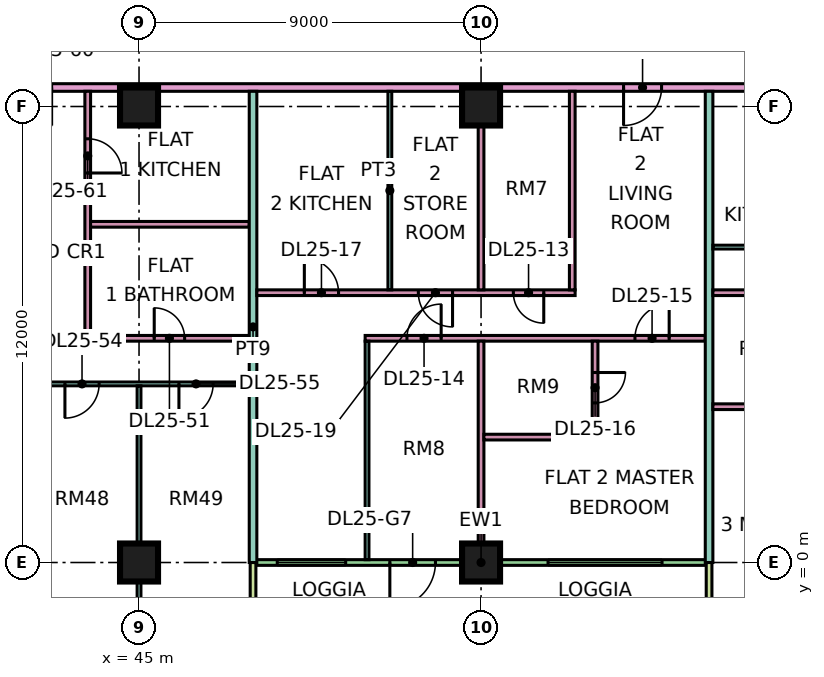
"""IFC4 building model, lengths in metres.
Left out: names, types, materials, properties, quantities, classifications, styles, units other than length and angle.
Written with IfcOpenShell. Run it as: python <this file> out.ifc"""

import sys

from ifc_helpers import new_model, si_unit, direction, frame, frame_2d, origin, origin_2d, place, context, subcontext, project, spatial, rectangle, extrude, element, fill, save


model = new_model("IFC4")
c1 = context("Model", 3, precision=1e-05, world=origin(), true_north=direction((0.0, 1.0)))
c2 = subcontext(c1, "Body", "Model", "MODEL_VIEW")
j1 = project(units=[si_unit("LENGTHUNIT", "METRE"), si_unit("PLANEANGLEUNIT", "RADIAN")], contexts=[c1])
p1 = place(None, origin())
s1 = spatial("IfcSite", under=j1, at=p1, CompositionType="ELEMENT")
p2 = place(p1, origin())
s2 = spatial("IfcBuilding", under=s1, at=p2, CompositionType="ELEMENT")
p3 = place(p2, frame((0.0, 0.0, 110.65)))
s3 = spatial("IfcBuildingStorey", under=s2, at=p3, CompositionType="ELEMENT", Elevation=110.65)
for number, where, z_axis, x_axis in (
    (1, (45.0, 0.0, 0.0), (0.0, 0.0, 1.0), (1.0, 0.0, 0.0)),
    (2, (45.0, 12.0, 0.0), (0.0, 0.0, 1.0), (1.0, 0.0, 0.0)),
    (3, (54.0, 0.0, 0.0), (0.0, 0.0, 1.0), (1.0, 0.0, 0.0)),
    (4, (54.0, 12.0, 0.0), (0.0, 0.0, 1.0), (1.0, 0.0, 0.0)),
):
    element("IfcColumn", number, at=place(p3, frame(where, z_axis=z_axis, x_axis=x_axis)), inside=s3, PredefinedType="COLUMN", context=c2, shape_type="SweptSolid", body=[
        extrude(rectangle(XDim=1.0, YDim=1.0, at=origin_2d()), origin(), (0.0, 0.0, 1.0), 3.75),
    ])
p4 = place(p3, frame((48.075, 0.0, 0.0), z_axis=(0.0, 0.0, 1.0), x_axis=(1.0, 0.0, 0.0)))
e5 = element("IfcWall", 5, at=p4, inside=s3, PredefinedType="SOLIDWALL", context=c2, shape_type="SweptSolid", body=[
    extrude(rectangle(XDim=11.85, YDim=0.15, at=frame_2d((5.925, 0.0))), origin(), (0.0, 0.0, 1.0), 3.35),
])
p5 = place(p4, frame((0.562, 0.0, 0.45)))
e6 = element("IfcOpeningElement", 6, at=p5, cuts=e5, PredefinedType="OPENING", context=c2, shape_type="SweptSolid", body=[
    extrude(rectangle(XDim=1.8, YDim=2.4, at=frame_2d((0.9, 1.2))), frame((0.0, 0.085, 0.0), z_axis=(0.0, -1.0, 0.0), x_axis=(1.0, 0.0, 0.0)), (0.0, 0.0, 1.0), 0.17),
])
p6 = place(p4, frame((3.525, 0.0, 0.0)))
e7 = element("IfcOpeningElement", 7, at=p6, cuts=e5, PredefinedType="OPENING", context=c2, shape_type="SweptSolid", body=[
    extrude(rectangle(XDim=1.2, YDim=2.4, at=frame_2d((0.6, 1.2))), frame((0.0, 0.085, 0.0), z_axis=(0.0, -1.0, 0.0), x_axis=(1.0, 0.0, 0.0)), (0.0, 0.0, 1.0), 0.17),
])
p7 = place(p4, frame((7.688, 0.0, 0.45)))
e8 = element("IfcOpeningElement", 8, at=p7, cuts=e5, PredefinedType="OPENING", context=c2, shape_type="SweptSolid", body=[
    extrude(rectangle(XDim=3.0, YDim=2.4, at=frame_2d((1.5, 1.2))), frame((0.0, 0.085, 0.0), z_axis=(0.0, -1.0, 0.0), x_axis=(1.0, 0.0, 0.0)), (0.0, 0.0, 1.0), 0.17),
])
for number, where, z_axis, x_axis in (
    (9, (48.0, -1.5, 0.0), (0.0, 0.0, 1.0), (0.0, 1.0, 0.0)),
    (10, (60.0, -1.5, 0.0), (0.0, 0.0, 1.0), (0.0, 1.0, 0.0)),
):
    element("IfcWall", number, at=place(p3, frame(where, z_axis=z_axis, x_axis=x_axis)), inside=s3, PredefinedType="SOLIDWALL", context=c2, shape_type="SweptSolid", body=[
        extrude(rectangle(XDim=1.5, YDim=0.15, at=frame_2d((0.75, 0.0))), origin(), (0.0, 0.0, 1.0), 3.35),
    ])
p8 = place(p3, frame((33.05, 4.7, 0.0), z_axis=(0.0, 0.0, 1.0), x_axis=(1.0, 0.0, 0.0)))
e11 = element("IfcWall", 11, at=p8, inside=s3, PredefinedType="PARTITIONING", context=c2, shape_type="SweptSolid", body=[
    extrude(rectangle(XDim=14.85, YDim=0.1, at=frame_2d((7.425, 0.0))), origin(), (0.0, 0.0, 1.0), 3.35),
])
p9 = place(p8, frame((10.0, 0.0, 0.0)))
e12 = element("IfcOpeningElement", 12, at=p9, cuts=e11, PredefinedType="OPENING", context=c2, shape_type="SweptSolid", body=[
    extrude(rectangle(XDim=0.9, YDim=2.1, at=frame_2d((0.45, 1.05))), frame((0.0, 0.06, 0.0), z_axis=(0.0, -1.0, 0.0), x_axis=(1.0, 0.0, 0.0)), (0.0, 0.0, 1.0), 0.12),
])
p10 = place(p8, frame((13.0, 0.0, 0.0)))
e13 = element("IfcOpeningElement", 13, at=p10, cuts=e11, PredefinedType="OPENING", context=c2, shape_type="SweptSolid", body=[
    extrude(rectangle(XDim=0.9, YDim=2.1, at=frame_2d((0.45, 1.05))), frame((0.0, 0.06, 0.0), z_axis=(0.0, -1.0, 0.0), x_axis=(1.0, 0.0, 0.0)), (0.0, 0.0, 1.0), 0.12),
])
p11 = place(p8, frame((4.0, 0.0, 0.0)))
e14 = element("IfcOpeningElement", 14, at=p11, cuts=e11, PredefinedType="OPENING", context=c2, shape_type="SweptSolid", body=[
    extrude(rectangle(XDim=0.9, YDim=2.1, at=frame_2d((0.45, 1.05))), frame((0.0, 0.06, 0.0), z_axis=(0.0, -1.0, 0.0), x_axis=(1.0, 0.0, 0.0)), (0.0, 0.0, 1.0), 0.12),
])
p12 = place(p3, frame((40.65, 12.5, 0.0), z_axis=(0.0, 0.0, 1.0), x_axis=(1.0, 0.0, 0.0)))
e15 = element("IfcWall", 15, at=p12, inside=s3, PredefinedType="PARTITIONING", context=c2, shape_type="SweptSolid", body=[
    extrude(rectangle(XDim=31.35, YDim=0.2, at=frame_2d((15.675, 0.0))), origin(), (0.0, 0.0, 1.0), 3.35),
])
p13 = place(p12, frame((17.1, 0.0, 0.0)))
e16 = element("IfcOpeningElement", 16, at=p13, cuts=e15, PredefinedType="OPENING", context=c2, shape_type="SweptSolid", body=[
    extrude(rectangle(XDim=1.0, YDim=2.1, at=frame_2d((0.5, 1.05))), frame((0.0, 0.11, 0.0), z_axis=(0.0, -1.0, 0.0), x_axis=(1.0, 0.0, 0.0)), (0.0, 0.0, 1.0), 0.22),
])
p14 = place(p12, frame((23.7, 0.0, 0.0)))
e17 = element("IfcOpeningElement", 17, at=p14, cuts=e15, PredefinedType="OPENING", context=c2, shape_type="SweptSolid", body=[
    extrude(rectangle(XDim=1.0, YDim=2.1, at=frame_2d((0.5, 1.05))), frame((0.0, 0.11, 0.0), z_axis=(0.0, -1.0, 0.0), x_axis=(1.0, 0.0, 0.0)), (0.0, 0.0, 1.0), 0.22),
])
p15 = place(p12, frame((1.05, 0.0, 0.0)))
e18 = element("IfcOpeningElement", 18, at=p15, cuts=e15, PredefinedType="OPENING", context=c2, shape_type="SweptSolid", body=[
    extrude(rectangle(XDim=1.0, YDim=2.1, at=frame_2d((0.5, 1.05))), frame((0.0, 0.11, 0.0), z_axis=(0.0, -1.0, 0.0), x_axis=(1.0, 0.0, 0.0)), (0.0, 0.0, 1.0), 0.22),
])
p16 = place(p3, frame((43.65, 5.825, 0.0), z_axis=(0.0, 0.0, 1.0), x_axis=(0.0, 1.0, 0.0)))
e19 = element("IfcWall", 19, at=p16, inside=s3, PredefinedType="PARTITIONING", context=c2, shape_type="SweptSolid", body=[
    extrude(rectangle(XDim=6.575, YDim=0.15, at=frame_2d((3.288, 0.0))), origin(), (0.0, 0.0, 1.0), 3.35),
])
p17 = place(p16, frame((4.425, 0.0, 0.0)))
e20 = element("IfcOpeningElement", 20, at=p17, cuts=e19, PredefinedType="OPENING", context=c2, shape_type="SweptSolid", body=[
    extrude(rectangle(XDim=0.9, YDim=2.1, at=frame_2d((0.45, 1.05))), frame((0.0, 0.085, 0.0), z_axis=(0.0, -1.0, 0.0), x_axis=(1.0, 0.0, 0.0)), (0.0, 0.0, 1.0), 0.17),
])
p18 = place(p3, frame((43.725, 5.9, 0.0), z_axis=(0.0, 0.0, 1.0), x_axis=(1.0, 0.0, 0.0)))
e21 = element("IfcWall", 21, at=p18, inside=s3, PredefinedType="PARTITIONING", context=c2, shape_type="SweptSolid", body=[
    extrude(rectangle(XDim=4.175, YDim=0.15, at=frame_2d((2.087, 0.0))), origin(), (0.0, 0.0, 1.0), 3.35),
])
p19 = place(p18, frame((1.675, 0.0, 0.0)))
e22 = element("IfcOpeningElement", 22, at=p19, cuts=e21, PredefinedType="OPENING", context=c2, shape_type="SweptSolid", body=[
    extrude(rectangle(XDim=0.8, YDim=2.1, at=frame_2d((0.4, 1.05))), frame((0.0, 0.085, 0.0), z_axis=(0.0, -1.0, 0.0), x_axis=(1.0, 0.0, 0.0)), (0.0, 0.0, 1.0), 0.17),
])
p20 = place(p3, frame((43.725, 8.9, 0.0), z_axis=(0.0, 0.0, 1.0), x_axis=(1.0, 0.0, 0.0)))
e23 = element("IfcWall", 23, at=p20, inside=s3, PredefinedType="PARTITIONING", context=c2, shape_type="SweptSolid", body=[
    extrude(rectangle(XDim=4.175, YDim=0.15, at=frame_2d((2.087, 0.0))), origin(), (0.0, 0.0, 1.0), 3.35),
])
p21 = place(p3, frame((45.0, -1.351, 0.0), z_axis=(0.0, 0.0, 1.0), x_axis=(0.0, 1.0, 0.0)))
e24 = element("IfcWall", 24, at=p21, inside=s3, PredefinedType="PARTITIONING", context=c2, shape_type="SweptSolid", body=[
    extrude(rectangle(XDim=6.001, YDim=0.1, at=frame_2d((3.0, 0.0))), origin(), (0.0, 0.0, 1.0), 3.35),
])
p22 = place(p3, frame((48.0, 0.0, 0.0), z_axis=(0.0, 0.0, 1.0), x_axis=(0.0, 1.0, 0.0)))
e25 = element("IfcWall", 25, at=p22, inside=s3, PredefinedType="PARTITIONING", context=c2, shape_type="SweptSolid", body=[
    extrude(rectangle(XDim=12.4, YDim=0.2, at=frame_2d((6.2, 0.0))), origin(), (0.0, 0.0, 1.0), 3.35),
])
p23 = place(p3, frame((48.1, 7.1, 0.0), z_axis=(0.0, 0.0, 1.0), x_axis=(1.0, 0.0, 0.0)))
e26 = element("IfcWall", 26, at=p23, inside=s3, PredefinedType="PARTITIONING", context=c2, shape_type="SweptSolid", body=[
    extrude(rectangle(XDim=8.375, YDim=0.15, at=frame_2d((4.188, 0.0))), origin(), (0.0, 0.0, 1.0), 3.35),
])
p24 = place(p23, frame((6.75, 0.0, 0.0)))
e27 = element("IfcOpeningElement", 27, at=p24, cuts=e26, PredefinedType="OPENING", context=c2, shape_type="SweptSolid", body=[
    extrude(rectangle(XDim=0.8, YDim=2.1, at=frame_2d((0.4, 1.05))), frame((0.0, 0.085, 0.0), z_axis=(0.0, -1.0, 0.0), x_axis=(1.0, 0.0, 0.0)), (0.0, 0.0, 1.0), 0.17),
])
p25 = place(p23, frame((1.25, 0.0, 0.0)))
e28 = element("IfcOpeningElement", 28, at=p25, cuts=e26, PredefinedType="OPENING", context=c2, shape_type="SweptSolid", body=[
    extrude(rectangle(XDim=0.9, YDim=2.1, at=frame_2d((0.45, 1.05))), frame((0.0, 0.085, 0.0), z_axis=(0.0, -1.0, 0.0), x_axis=(1.0, 0.0, 0.0)), (0.0, 0.0, 1.0), 0.17),
])
p26 = place(p23, frame((4.25, 0.0, 0.0)))
e29 = element("IfcOpeningElement", 29, at=p26, cuts=e26, PredefinedType="OPENING", context=c2, shape_type="SweptSolid", body=[
    extrude(rectangle(XDim=0.9, YDim=2.1, at=frame_2d((0.45, 1.05))), frame((0.0, 0.085, 0.0), z_axis=(0.0, -1.0, 0.0), x_axis=(1.0, 0.0, 0.0)), (0.0, 0.0, 1.0), 0.17),
])
p27 = place(p3, frame((50.95, 5.9, 0.0), z_axis=(0.0, 0.0, 1.0), x_axis=(1.0, 0.0, 0.0)))
e30 = element("IfcWall", 30, at=p27, inside=s3, PredefinedType="PARTITIONING", context=c2, shape_type="SweptSolid", body=[
    extrude(rectangle(XDim=8.95, YDim=0.15, at=frame_2d((4.475, 0.0))), origin(), (0.0, 0.0, 1.0), 3.35),
])
p28 = place(p27, frame((1.1, 0.0, 0.0)))
e31 = element("IfcOpeningElement", 31, at=p28, cuts=e30, PredefinedType="OPENING", context=c2, shape_type="SweptSolid", body=[
    extrude(rectangle(XDim=0.9, YDim=2.1, at=frame_2d((0.45, 1.05))), frame((0.0, 0.085, 0.0), z_axis=(0.0, -1.0, 0.0), x_axis=(1.0, 0.0, 0.0)), (0.0, 0.0, 1.0), 0.17),
])
p29 = place(p27, frame((7.1, 0.0, 0.0)))
e32 = element("IfcOpeningElement", 32, at=p29, cuts=e30, PredefinedType="OPENING", context=c2, shape_type="SweptSolid", body=[
    extrude(rectangle(XDim=0.9, YDim=2.1, at=frame_2d((0.45, 1.05))), frame((0.0, 0.085, 0.0), z_axis=(0.0, -1.0, 0.0), x_axis=(1.0, 0.0, 0.0)), (0.0, 0.0, 1.0), 0.17),
])
p30 = place(p3, frame((51.0, 0.074, 0.0), z_axis=(0.0, 0.0, 1.0), x_axis=(0.0, 1.0, 0.0)))
e33 = element("IfcWall", 33, at=p30, inside=s3, PredefinedType="PARTITIONING", context=c2, shape_type="SweptSolid", body=[
    extrude(rectangle(XDim=5.751, YDim=0.1, at=frame_2d((2.875, 0.0))), origin(), (0.0, 0.0, 1.0), 3.35),
])
p31 = place(p3, frame((51.6, 7.175, 0.0), z_axis=(0.0, 0.0, 1.0), x_axis=(0.0, 1.0, 0.0)))
e34 = element("IfcWall", 34, at=p31, inside=s3, PredefinedType="PARTITIONING", context=c2, shape_type="SweptSolid", body=[
    extrude(rectangle(XDim=5.225, YDim=0.1, at=frame_2d((2.612, 0.0))), origin(), (0.0, 0.0, 1.0), 3.35),
])
p32 = place(p3, frame((54.0, 0.074, 0.0), z_axis=(0.0, 0.0, 1.0), x_axis=(0.0, 1.0, 0.0)))
e35 = element("IfcWall", 35, at=p32, inside=s3, PredefinedType="PARTITIONING", context=c2, shape_type="SweptSolid", body=[
    extrude(rectangle(XDim=5.751, YDim=0.15, at=frame_2d((2.875, 0.0))), origin(), (0.0, 0.0, 1.0), 3.35),
])
p33 = place(p3, frame((54.0, 7.175, 0.0), z_axis=(0.0, 0.0, 1.0), x_axis=(0.0, 1.0, 0.0)))
e36 = element("IfcWall", 36, at=p33, inside=s3, PredefinedType="PARTITIONING", context=c2, shape_type="SweptSolid", body=[
    extrude(rectangle(XDim=5.225, YDim=0.15, at=frame_2d((2.612, 0.0))), origin(), (0.0, 0.0, 1.0), 3.35),
])
p34 = place(p3, frame((54.075, 3.3, 0.0), z_axis=(0.0, 0.0, 1.0), x_axis=(1.0, 0.0, 0.0)))
e37 = element("IfcWall", 37, at=p34, inside=s3, PredefinedType="PARTITIONING", context=c2, shape_type="SweptSolid", body=[
    extrude(rectangle(XDim=3.0, YDim=0.15, at=frame_2d((1.5, 0.0))), origin(), (0.0, 0.0, 1.0), 3.35),
])
p35 = place(p3, frame((56.4, 7.175, 0.0), z_axis=(0.0, 0.0, 1.0), x_axis=(0.0, 1.0, 0.0)))
e38 = element("IfcWall", 38, at=p35, inside=s3, PredefinedType="PARTITIONING", context=c2, shape_type="SweptSolid", body=[
    extrude(rectangle(XDim=5.225, YDim=0.15, at=frame_2d((2.612, 0.0))), origin(), (0.0, 0.0, 1.0), 3.35),
])
p36 = place(p3, frame((57.0, 3.375, 0.0), z_axis=(0.0, 0.0, 1.0), x_axis=(0.0, 1.0, 0.0)))
e39 = element("IfcWall", 39, at=p36, inside=s3, PredefinedType="PARTITIONING", context=c2, shape_type="SweptSolid", body=[
    extrude(rectangle(XDim=2.45, YDim=0.15, at=frame_2d((1.225, 0.0))), origin(), (0.0, 0.0, 1.0), 3.35),
])
p37 = place(p36, frame((0.825, 0.0, 0.0)))
e40 = element("IfcOpeningElement", 40, at=p37, cuts=e39, PredefinedType="OPENING", context=c2, shape_type="SweptSolid", body=[
    extrude(rectangle(XDim=0.8, YDim=2.1, at=frame_2d((0.4, 1.05))), frame((0.0, 0.085, 0.0), z_axis=(0.0, -1.0, 0.0), x_axis=(1.0, 0.0, 0.0)), (0.0, 0.0, 1.0), 0.17),
])
p38 = place(p3, frame((60.0, 0.0, 0.0), z_axis=(0.0, 0.0, 1.0), x_axis=(0.0, 1.0, 0.0)))
e41 = element("IfcWall", 41, at=p38, inside=s3, PredefinedType="PARTITIONING", context=c2, shape_type="SweptSolid", body=[
    extrude(rectangle(XDim=12.4, YDim=0.2, at=frame_2d((6.2, 0.0))), origin(), (0.0, 0.0, 1.0), 3.35),
])
p39 = place(p3, frame((60.1, 4.1, 0.0), z_axis=(0.0, 0.0, 1.0), x_axis=(1.0, 0.0, 0.0)))
e42 = element("IfcWall", 42, at=p39, inside=s3, PredefinedType="PARTITIONING", context=c2, shape_type="SweptSolid", body=[
    extrude(rectangle(XDim=2.825, YDim=0.15, at=frame_2d((1.413, 0.0))), origin(), (0.0, 0.0, 1.0), 3.35),
])
p40 = place(p3, frame((60.1, 7.1, 0.0), z_axis=(0.0, 0.0, 1.0), x_axis=(1.0, 0.0, 0.0)))
e43 = element("IfcWall", 43, at=p40, inside=s3, PredefinedType="PARTITIONING", context=c2, shape_type="SweptSolid", body=[
    extrude(rectangle(XDim=5.95, YDim=0.15, at=frame_2d((2.975, 0.0))), origin(), (0.0, 0.0, 1.0), 3.35),
])
p41 = place(p40, frame((3.95, 0.0, 0.0)))
e44 = element("IfcOpeningElement", 44, at=p41, cuts=e43, PredefinedType="OPENING", context=c2, shape_type="SweptSolid", body=[
    extrude(rectangle(XDim=0.9, YDim=2.1, at=frame_2d((0.45, 1.05))), frame((0.0, 0.085, 0.0), z_axis=(0.0, -1.0, 0.0), x_axis=(1.0, 0.0, 0.0)), (0.0, 0.0, 1.0), 0.17),
])
p42 = place(p3, frame((60.1, 8.3, 0.0), z_axis=(0.0, 0.0, 1.0), x_axis=(1.0, 0.0, 0.0)))
e45 = element("IfcWall", 45, at=p42, inside=s3, PredefinedType="PARTITIONING", context=c2, shape_type="SweptSolid", body=[
    extrude(rectangle(XDim=2.85, YDim=0.1, at=frame_2d((1.425, 0.0))), origin(), (0.0, 0.0, 1.0), 3.35),
])
p43 = place(p5, origin())
e46 = element("IfcWindow", 46, at=p43, inside=s3, PartitioningType="SINGLE_PANEL", PredefinedType="WINDOW", context=c2, shape_type="SweptSolid", body=[
    extrude(rectangle(XDim=1.8, YDim=2.4, at=frame_2d((0.9, 1.2))), frame((0.0, 0.03, 0.0), z_axis=(0.0, -1.0, 0.0), x_axis=(1.0, 0.0, 0.0)), (0.0, 0.0, 1.0), 0.06),
])
fill(e6, e46)
p44 = place(p6, frame((1.2, 0.0, 0.0), z_axis=(0.0, 0.0, 1.0), x_axis=(-1.0, 0.0, 0.0)))
e47 = element("IfcDoor", 47, at=p44, inside=s3, OperationType="DOUBLE_DOOR_SINGLE_SWING", PredefinedType="DOOR", context=c2, shape_type="SweptSolid", body=[
    extrude(rectangle(XDim=1.2, YDim=2.4, at=frame_2d((0.6, 1.2))), frame((0.0, 0.025, 0.0), z_axis=(0.0, -1.0, 0.0), x_axis=(1.0, 0.0, 0.0)), (0.0, 0.0, 1.0), 0.05),
])
fill(e7, e47)
p45 = place(p7, origin())
e48 = element("IfcWindow", 48, at=p45, inside=s3, PartitioningType="SINGLE_PANEL", PredefinedType="WINDOW", context=c2, shape_type="SweptSolid", body=[
    extrude(rectangle(XDim=3.0, YDim=2.4, at=frame_2d((1.5, 1.2))), frame((0.0, 0.03, 0.0), z_axis=(0.0, -1.0, 0.0), x_axis=(1.0, 0.0, 0.0)), (0.0, 0.0, 1.0), 0.06),
])
fill(e8, e48)
p46 = place(p24, origin())
e49 = element("IfcDoor", 49, at=p46, inside=s3, OperationType="SINGLE_SWING_RIGHT", PredefinedType="DOOR", context=c2, shape_type="SweptSolid", body=[
    extrude(rectangle(XDim=0.8, YDim=2.1, at=frame_2d((0.4, 1.05))), frame((0.0, 0.025, 0.0), z_axis=(0.0, -1.0, 0.0), x_axis=(1.0, 0.0, 0.0)), (0.0, 0.0, 1.0), 0.05),
])
fill(e27, e49)
p47 = place(p28, frame((0.9, 0.0, 0.0), z_axis=(0.0, 0.0, 1.0), x_axis=(-1.0, 0.0, 0.0)))
e50 = element("IfcDoor", 50, at=p47, inside=s3, OperationType="SINGLE_SWING_RIGHT", PredefinedType="DOOR", context=c2, shape_type="SweptSolid", body=[
    extrude(rectangle(XDim=0.9, YDim=2.1, at=frame_2d((0.45, 1.05))), frame((0.0, 0.025, 0.0), z_axis=(0.0, -1.0, 0.0), x_axis=(1.0, 0.0, 0.0)), (0.0, 0.0, 1.0), 0.05),
])
fill(e31, e50)
p48 = place(p29, frame((0.9, 0.0, 0.0), z_axis=(0.0, 0.0, 1.0), x_axis=(-1.0, 0.0, 0.0)))
e51 = element("IfcDoor", 51, at=p48, inside=s3, OperationType="SINGLE_SWING_RIGHT", PredefinedType="DOOR", context=c2, shape_type="SweptSolid", body=[
    extrude(rectangle(XDim=0.9, YDim=2.1, at=frame_2d((0.45, 1.05))), frame((0.0, 0.025, 0.0), z_axis=(0.0, -1.0, 0.0), x_axis=(1.0, 0.0, 0.0)), (0.0, 0.0, 1.0), 0.05),
])
fill(e32, e51)
p49 = place(p37, origin())
e52 = element("IfcDoor", 52, at=p49, inside=s3, OperationType="SINGLE_SWING_RIGHT", PredefinedType="DOOR", context=c2, shape_type="SweptSolid", body=[
    extrude(rectangle(XDim=0.8, YDim=2.1, at=frame_2d((0.4, 1.05))), frame((0.0, 0.025, 0.0), z_axis=(0.0, -1.0, 0.0), x_axis=(1.0, 0.0, 0.0)), (0.0, 0.0, 1.0), 0.05),
])
fill(e40, e52)
p50 = place(p25, origin())
e53 = element("IfcDoor", 53, at=p50, inside=s3, OperationType="SINGLE_SWING_LEFT", PredefinedType="DOOR", context=c2, shape_type="SweptSolid", body=[
    extrude(rectangle(XDim=0.9, YDim=2.1, at=frame_2d((0.45, 1.05))), frame((0.0, 0.025, 0.0), z_axis=(0.0, -1.0, 0.0), x_axis=(1.0, 0.0, 0.0)), (0.0, 0.0, 1.0), 0.05),
])
fill(e28, e53)
p51 = place(p13, frame((1.0, 0.0, 0.0), z_axis=(0.0, 0.0, 1.0), x_axis=(-1.0, 0.0, 0.0)))
e54 = element("IfcDoor", 54, at=p51, inside=s3, OperationType="SINGLE_SWING_LEFT", PredefinedType="DOOR", context=c2, shape_type="SweptSolid", body=[
    extrude(rectangle(XDim=1.0, YDim=2.1, at=frame_2d((0.5, 1.05))), frame((0.0, 0.025, 0.0), z_axis=(0.0, -1.0, 0.0), x_axis=(1.0, 0.0, 0.0)), (0.0, 0.0, 1.0), 0.05),
])
fill(e16, e54)
p52 = place(p26, origin())
e55 = element("IfcDoor", 55, at=p52, inside=s3, OperationType="SINGLE_SWING_RIGHT", PredefinedType="DOOR", context=c2, shape_type="SweptSolid", body=[
    extrude(rectangle(XDim=0.9, YDim=2.1, at=frame_2d((0.45, 1.05))), frame((0.0, 0.025, 0.0), z_axis=(0.0, -1.0, 0.0), x_axis=(1.0, 0.0, 0.0)), (0.0, 0.0, 1.0), 0.05),
])
fill(e29, e55)
p53 = place(p19, origin())
e56 = element("IfcDoor", 56, at=p53, inside=s3, OperationType="SINGLE_SWING_LEFT", PredefinedType="DOOR", context=c2, shape_type="SweptSolid", body=[
    extrude(rectangle(XDim=0.8, YDim=2.1, at=frame_2d((0.4, 1.05))), frame((0.0, 0.025, 0.0), z_axis=(0.0, -1.0, 0.0), x_axis=(1.0, 0.0, 0.0)), (0.0, 0.0, 1.0), 0.05),
])
fill(e22, e56)
p54 = place(p9, frame((0.9, 0.0, 0.0), z_axis=(0.0, 0.0, 1.0), x_axis=(-1.0, 0.0, 0.0)))
e57 = element("IfcDoor", 57, at=p54, inside=s3, OperationType="SINGLE_SWING_LEFT", PredefinedType="DOOR", context=c2, shape_type="SweptSolid", body=[
    extrude(rectangle(XDim=0.9, YDim=2.1, at=frame_2d((0.45, 1.05))), frame((0.0, 0.025, 0.0), z_axis=(0.0, -1.0, 0.0), x_axis=(1.0, 0.0, 0.0)), (0.0, 0.0, 1.0), 0.05),
])
fill(e12, e57)
p55 = place(p10, frame((0.9, 0.0, 0.0), z_axis=(0.0, 0.0, 1.0), x_axis=(-1.0, 0.0, 0.0)))
e58 = element("IfcDoor", 58, at=p55, inside=s3, OperationType="SINGLE_SWING_LEFT", PredefinedType="DOOR", context=c2, shape_type="SweptSolid", body=[
    extrude(rectangle(XDim=0.9, YDim=2.1, at=frame_2d((0.45, 1.05))), frame((0.0, 0.025, 0.0), z_axis=(0.0, -1.0, 0.0), x_axis=(1.0, 0.0, 0.0)), (0.0, 0.0, 1.0), 0.05),
])
fill(e13, e58)
p56 = place(p17, frame((0.9, 0.0, 0.0), z_axis=(0.0, 0.0, 1.0), x_axis=(-1.0, 0.0, 0.0)))
e59 = element("IfcDoor", 59, at=p56, inside=s3, OperationType="SINGLE_SWING_LEFT", PredefinedType="DOOR", context=c2, shape_type="SweptSolid", body=[
    extrude(rectangle(XDim=0.9, YDim=2.1, at=frame_2d((0.45, 1.05))), frame((0.0, 0.025, 0.0), z_axis=(0.0, -1.0, 0.0), x_axis=(1.0, 0.0, 0.0)), (0.0, 0.0, 1.0), 0.05),
])
fill(e20, e59)
save(model, sys.argv[1])
